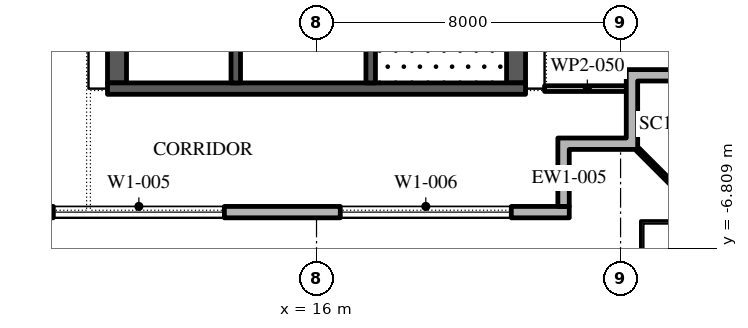
"""IFC4 building model, lengths in metres.
Left out: names, types, materials, properties, quantities, classifications, styles, units other than length and angle.
Written with IfcOpenShell. Run it as: python <this file> out.ifc"""

import sys

from ifc_helpers import new_model, si_unit, direction, frame, frame_2d, origin, place, context, subcontext, project, spatial, polyline, rectangle, outline, extrude, element, fill, save


model = new_model("IFC4")
c1 = context("Model", 3, precision=1e-05, world=origin(), true_north=direction((0.0, 1.0)))
c2 = subcontext(c1, "Body", "Model", "MODEL_VIEW")
j1 = project(units=[si_unit("LENGTHUNIT", "METRE"), si_unit("PLANEANGLEUNIT", "RADIAN")], contexts=[c1])
p1 = place(None, origin())
s1 = spatial("IfcSite", under=j1, at=p1, CompositionType="ELEMENT")
p2 = place(p1, origin())
s2 = spatial("IfcBuilding", under=s1, at=p2, CompositionType="ELEMENT")
p3 = place(p2, frame((0.0, 0.0, 342.6)))
s3 = spatial("IfcBuildingStorey", under=s2, at=p3, CompositionType="ELEMENT", Elevation=342.6)
p4 = place(p3, frame((-22.35, -5.85, 0.0), z_axis=(0.0, 0.0, 1.0), x_axis=(1.0, 0.0, 0.0)))
e1 = element("IfcWall", 1, at=p4, inside=s3, PredefinedType="STANDARD", context=c2, shape_type="SweptSolid", body=[
    extrude(rectangle(XDim=45.0, YDim=0.3, at=frame_2d((22.5, 0.0))), origin(), (0.0, 0.0, 1.0), 4.0),
])
p5 = place(p4, frame((1.375, 0.0, 0.45)))
e2 = element("IfcOpeningElement", 2, at=p5, cuts=e1, PredefinedType="OPENING", context=c2, shape_type="SweptSolid", body=[
    extrude(rectangle(XDim=4.5, YDim=3.05, at=frame_2d((2.25, 1.525))), frame((0.0, 0.16, 0.0), z_axis=(0.0, -1.0, 0.0), x_axis=(1.0, 0.0, 0.0)), (0.0, 0.0, 1.0), 0.32),
])
p6 = place(p4, frame((8.775, 0.0, 0.45)))
e3 = element("IfcOpeningElement", 3, at=p6, cuts=e1, PredefinedType="OPENING", context=c2, shape_type="SweptSolid", body=[
    extrude(rectangle(XDim=4.5, YDim=3.05, at=frame_2d((2.25, 1.525))), frame((0.0, 0.16, 0.0), z_axis=(0.0, -1.0, 0.0), x_axis=(1.0, 0.0, 0.0)), (0.0, 0.0, 1.0), 0.32),
])
p7 = place(p4, frame((17.375, 0.0, 0.0)))
e4 = element("IfcOpeningElement", 4, at=p7, cuts=e1, PredefinedType="OPENING", context=c2, shape_type="SweptSolid", body=[
    extrude(rectangle(XDim=2.4, YDim=3.5, at=frame_2d((1.2, 1.75))), frame((0.0, 0.16, 0.0), z_axis=(0.0, -1.0, 0.0), x_axis=(1.0, 0.0, 0.0)), (0.0, 0.0, 1.0), 0.32),
])
p8 = place(p4, frame((23.875, 0.0, 0.45)))
e5 = element("IfcOpeningElement", 5, at=p8, cuts=e1, PredefinedType="OPENING", context=c2, shape_type="SweptSolid", body=[
    extrude(rectangle(XDim=4.5, YDim=3.05, at=frame_2d((2.25, 1.525))), frame((0.0, 0.16, 0.0), z_axis=(0.0, -1.0, 0.0), x_axis=(1.0, 0.0, 0.0)), (0.0, 0.0, 1.0), 0.32),
])
p9 = place(p4, frame((31.425, 0.0, 0.45)))
e6 = element("IfcOpeningElement", 6, at=p9, cuts=e1, PredefinedType="OPENING", context=c2, shape_type="SweptSolid", body=[
    extrude(rectangle(XDim=4.5, YDim=3.05, at=frame_2d((2.25, 1.525))), frame((0.0, 0.16, 0.0), z_axis=(0.0, -1.0, 0.0), x_axis=(1.0, 0.0, 0.0)), (0.0, 0.0, 1.0), 0.32),
])
p10 = place(p4, frame((38.975, 0.0, 0.45)))
e7 = element("IfcOpeningElement", 7, at=p10, cuts=e1, PredefinedType="OPENING", context=c2, shape_type="SweptSolid", body=[
    extrude(rectangle(XDim=4.5, YDim=3.05, at=frame_2d((2.25, 1.525))), frame((0.0, 0.16, 0.0), z_axis=(0.0, -1.0, 0.0), x_axis=(1.0, 0.0, 0.0)), (0.0, 0.0, 1.0), 0.32),
])
p11 = place(p3, origin())
e8 = element("IfcWall", 8, at=p11, inside=s3, PredefinedType="STANDARD", context=c2, shape_type="SweptSolid", body=[
    extrude(outline(polyline([(24.15, -3.9), (24.15, -2.1), (26.25, -2.1), (26.25, -2.4), (24.45, -2.4), (24.45, -4.2), (22.65, -4.2), (22.65, -5.7), (22.35, -5.7), (22.35, -3.9), (24.15, -3.9)])), origin(), (0.0, 0.0, 1.0), 4.0),
])
p12 = place(p3, frame((24.45, -4.2, -0.05), z_axis=(0.0, 0.0, 1.0), x_axis=(0.707106781187, -0.707106781187, 0.0)))
e9 = element("IfcWall", 9, at=p12, inside=s3, PredefinedType="STANDARD", context=c2, shape_type="SweptSolid", body=[
    extrude(rectangle(XDim=2.667, YDim=0.1, at=frame_2d((1.333, 0.0))), origin(), (0.0, 0.0, 1.0), 4.05),
])
p13 = place(p3, frame((21.25, -2.45, 0.0), z_axis=(0.0, 0.0, 1.0), x_axis=(0.0, 1.0, 0.0)))
e10 = element("IfcWall", 10, at=p13, inside=s3, PredefinedType="SHEAR", context=c2, shape_type="SweptSolid", body=[
    extrude(rectangle(XDim=27.9, YDim=0.5, at=frame_2d((13.95, 0.0))), origin(), (0.0, 0.0, 1.0), 4.0),
])
p14 = place(p13, frame((5.05, 0.0, 0.0)))
e11 = element("IfcOpeningElement", 11, at=p14, cuts=e10, PredefinedType="OPENING", context=c2, shape_type="SweptSolid", body=[
    extrude(rectangle(XDim=1.2, YDim=2.1, at=frame_2d((0.6, 1.05))), frame((0.0, 0.26, 0.0), z_axis=(0.0, -1.0, 0.0), x_axis=(1.0, 0.0, 0.0)), (0.0, 0.0, 1.0), 0.52),
])
p15 = place(p13, frame((21.65, 0.0, 0.0)))
e12 = element("IfcOpeningElement", 12, at=p15, cuts=e10, PredefinedType="OPENING", context=c2, shape_type="SweptSolid", body=[
    extrude(rectangle(XDim=1.2, YDim=2.1, at=frame_2d((0.6, 1.05))), frame((0.0, 0.26, 0.0), z_axis=(0.0, -1.0, 0.0), x_axis=(1.0, 0.0, 0.0)), (0.0, 0.0, 1.0), 0.52),
])
p16 = place(p3, frame((10.75, -2.45, 0.0), z_axis=(0.0, 0.0, 1.0), x_axis=(0.0, 1.0, 0.0)))
e13 = element("IfcWall", 13, at=p16, inside=s3, PredefinedType="SHEAR", context=c2, shape_type="SweptSolid", body=[
    extrude(rectangle(XDim=27.9, YDim=0.5, at=frame_2d((13.95, 0.0))), origin(), (0.0, 0.0, 1.0), 4.0),
])
p17 = place(p16, frame((23.65, 0.0, 0.0)))
e14 = element("IfcOpeningElement", 14, at=p17, cuts=e13, PredefinedType="OPENING", context=c2, shape_type="SweptSolid", body=[
    extrude(rectangle(XDim=2.4, YDim=2.1, at=frame_2d((1.2, 1.05))), frame((0.0, 0.26, 0.0), z_axis=(0.0, -1.0, 0.0), x_axis=(1.0, 0.0, 0.0)), (0.0, 0.0, 1.0), 0.52),
])
p18 = place(p16, frame((1.087, 0.0, 0.0)))
e15 = element("IfcOpeningElement", 15, at=p18, cuts=e13, PredefinedType="OPENING", context=c2, shape_type="SweptSolid", body=[
    extrude(rectangle(XDim=0.9, YDim=2.1, at=frame_2d((0.45, 1.05))), frame((0.0, 0.26, 0.0), z_axis=(0.0, -1.0, 0.0), x_axis=(1.0, 0.0, 0.0)), (0.0, 0.0, 1.0), 0.52),
])
p19 = place(p16, frame((4.262, 0.0, 0.0)))
e16 = element("IfcOpeningElement", 16, at=p19, cuts=e13, PredefinedType="OPENING", context=c2, shape_type="SweptSolid", body=[
    extrude(rectangle(XDim=1.0, YDim=2.1, at=frame_2d((0.5, 1.05))), frame((0.0, 0.26, 0.0), z_axis=(0.0, -1.0, 0.0), x_axis=(1.0, 0.0, 0.0)), (0.0, 0.0, 1.0), 0.52),
])
p20 = place(p3, frame((10.5, -2.6, 0.0), z_axis=(0.0, 0.0, 1.0), x_axis=(1.0, 0.0, 0.0)))
e17 = element("IfcWall", 17, at=p20, inside=s3, PredefinedType="SHEAR", context=c2, shape_type="SweptSolid", body=[
    extrude(rectangle(XDim=11.0, YDim=0.3, at=frame_2d((5.5, 0.0))), origin(), (0.0, 0.0, 1.0), 4.0),
])
p21 = place(p3, frame((17.425, -2.45, 0.0), z_axis=(0.0, 0.0, 1.0), x_axis=(0.0, 1.0, 0.0)))
e18 = element("IfcWall", 18, at=p21, inside=s3, PredefinedType="SHEAR", context=c2, shape_type="SweptSolid", body=[
    extrude(rectangle(XDim=6.3, YDim=0.25, at=frame_2d((3.15, 0.0))), origin(), (0.0, 0.0, 1.0), 4.0),
])
p22 = place(p21, frame((5.05, 0.0, 0.0)))
e19 = element("IfcOpeningElement", 19, at=p22, cuts=e18, PredefinedType="OPENING", context=c2, shape_type="SweptSolid", body=[
    extrude(rectangle(XDim=1.2, YDim=2.1, at=frame_2d((0.6, 1.05))), frame((0.0, 0.135, 0.0), z_axis=(0.0, -1.0, 0.0), x_axis=(1.0, 0.0, 0.0)), (0.0, 0.0, 1.0), 0.27),
])
p23 = place(p3, frame((13.875, -2.45, 0.0), z_axis=(0.0, 0.0, 1.0), x_axis=(0.0, 1.0, 0.0)))
e20 = element("IfcWall", 20, at=p23, inside=s3, PredefinedType="SHEAR", context=c2, shape_type="SweptSolid", body=[
    extrude(rectangle(XDim=21.3, YDim=0.25, at=frame_2d((10.65, 0.0))), origin(), (0.0, 0.0, 1.0), 4.0),
])
p24 = place(p23, frame((11.357, 0.0, 0.0)))
e21 = element("IfcOpeningElement", 21, at=p24, cuts=e20, PredefinedType="OPENING", context=c2, shape_type="SweptSolid", body=[
    extrude(rectangle(XDim=0.9, YDim=2.1, at=frame_2d((0.45, 1.05))), frame((0.0, 0.135, 0.0), z_axis=(0.0, -1.0, 0.0), x_axis=(1.0, 0.0, 0.0)), (0.0, 0.0, 1.0), 0.27),
])
p25 = place(p23, frame((6.971, 0.0, 0.0)))
e22 = element("IfcOpeningElement", 22, at=p25, cuts=e20, PredefinedType="OPENING", context=c2, shape_type="SweptSolid", body=[
    extrude(rectangle(XDim=1.1, YDim=2.1, at=frame_2d((0.55, 1.05))), frame((0.0, 0.135, 0.0), z_axis=(0.0, -1.0, 0.0), x_axis=(1.0, 0.0, 0.0)), (0.0, 0.0, 1.0), 0.27),
])
p26 = place(p23, frame((15.543, 0.0, 0.0)))
e23 = element("IfcOpeningElement", 23, at=p26, cuts=e20, PredefinedType="OPENING", context=c2, shape_type="SweptSolid", body=[
    extrude(rectangle(XDim=1.1, YDim=2.1, at=frame_2d((0.55, 1.05))), frame((0.0, 0.135, 0.0), z_axis=(0.0, -1.0, 0.0), x_axis=(1.0, 0.0, 0.0)), (0.0, 0.0, 1.0), 0.27),
])
p27 = place(p23, frame((17.686, 0.0, 0.0)))
e24 = element("IfcOpeningElement", 24, at=p27, cuts=e20, PredefinedType="OPENING", context=c2, shape_type="SweptSolid", body=[
    extrude(rectangle(XDim=1.1, YDim=2.1, at=frame_2d((0.55, 1.05))), frame((0.0, 0.135, 0.0), z_axis=(0.0, -1.0, 0.0), x_axis=(1.0, 0.0, 0.0)), (0.0, 0.0, 1.0), 0.27),
])
p28 = place(p23, frame((19.829, 0.0, 0.0)))
e25 = element("IfcOpeningElement", 25, at=p28, cuts=e20, PredefinedType="OPENING", context=c2, shape_type="SweptSolid", body=[
    extrude(rectangle(XDim=1.1, YDim=2.1, at=frame_2d((0.55, 1.05))), frame((0.0, 0.135, 0.0), z_axis=(0.0, -1.0, 0.0), x_axis=(1.0, 0.0, 0.0)), (0.0, 0.0, 1.0), 0.27),
])
p29 = place(p3, frame((22.0, -2.6, 0.0), z_axis=(0.0, 0.0, 1.0), x_axis=(1.0, 0.0, 0.0)))
e26 = element("IfcWall", 26, at=p29, inside=s3, PredefinedType="PARTITIONING", context=c2, shape_type="SweptSolid", body=[
    extrude(rectangle(XDim=2.25, YDim=0.15, at=frame_2d((1.125, 0.0))), origin(), (0.0, 0.0, 1.0), 4.0),
])
p30 = place(p9, origin())
e27 = element("IfcWindow", 27, at=p30, inside=s3, PartitioningType="DOUBLE_PANEL_VERTICAL", PredefinedType="WINDOW", context=c2, shape_type="SweptSolid", body=[
    extrude(rectangle(XDim=4.5, YDim=3.05, at=frame_2d((2.25, 1.525))), frame((0.0, 0.03, 0.0), z_axis=(0.0, -1.0, 0.0), x_axis=(1.0, 0.0, 0.0)), (0.0, 0.0, 1.0), 0.06),
])
fill(e6, e27)
p31 = place(p10, origin())
e28 = element("IfcWindow", 28, at=p31, inside=s3, PartitioningType="DOUBLE_PANEL_VERTICAL", PredefinedType="WINDOW", context=c2, shape_type="SweptSolid", body=[
    extrude(rectangle(XDim=4.5, YDim=3.05, at=frame_2d((2.25, 1.525))), frame((0.0, 0.03, 0.0), z_axis=(0.0, -1.0, 0.0), x_axis=(1.0, 0.0, 0.0)), (0.0, 0.0, 1.0), 0.06),
])
fill(e7, e28)
save(model, sys.argv[1])
